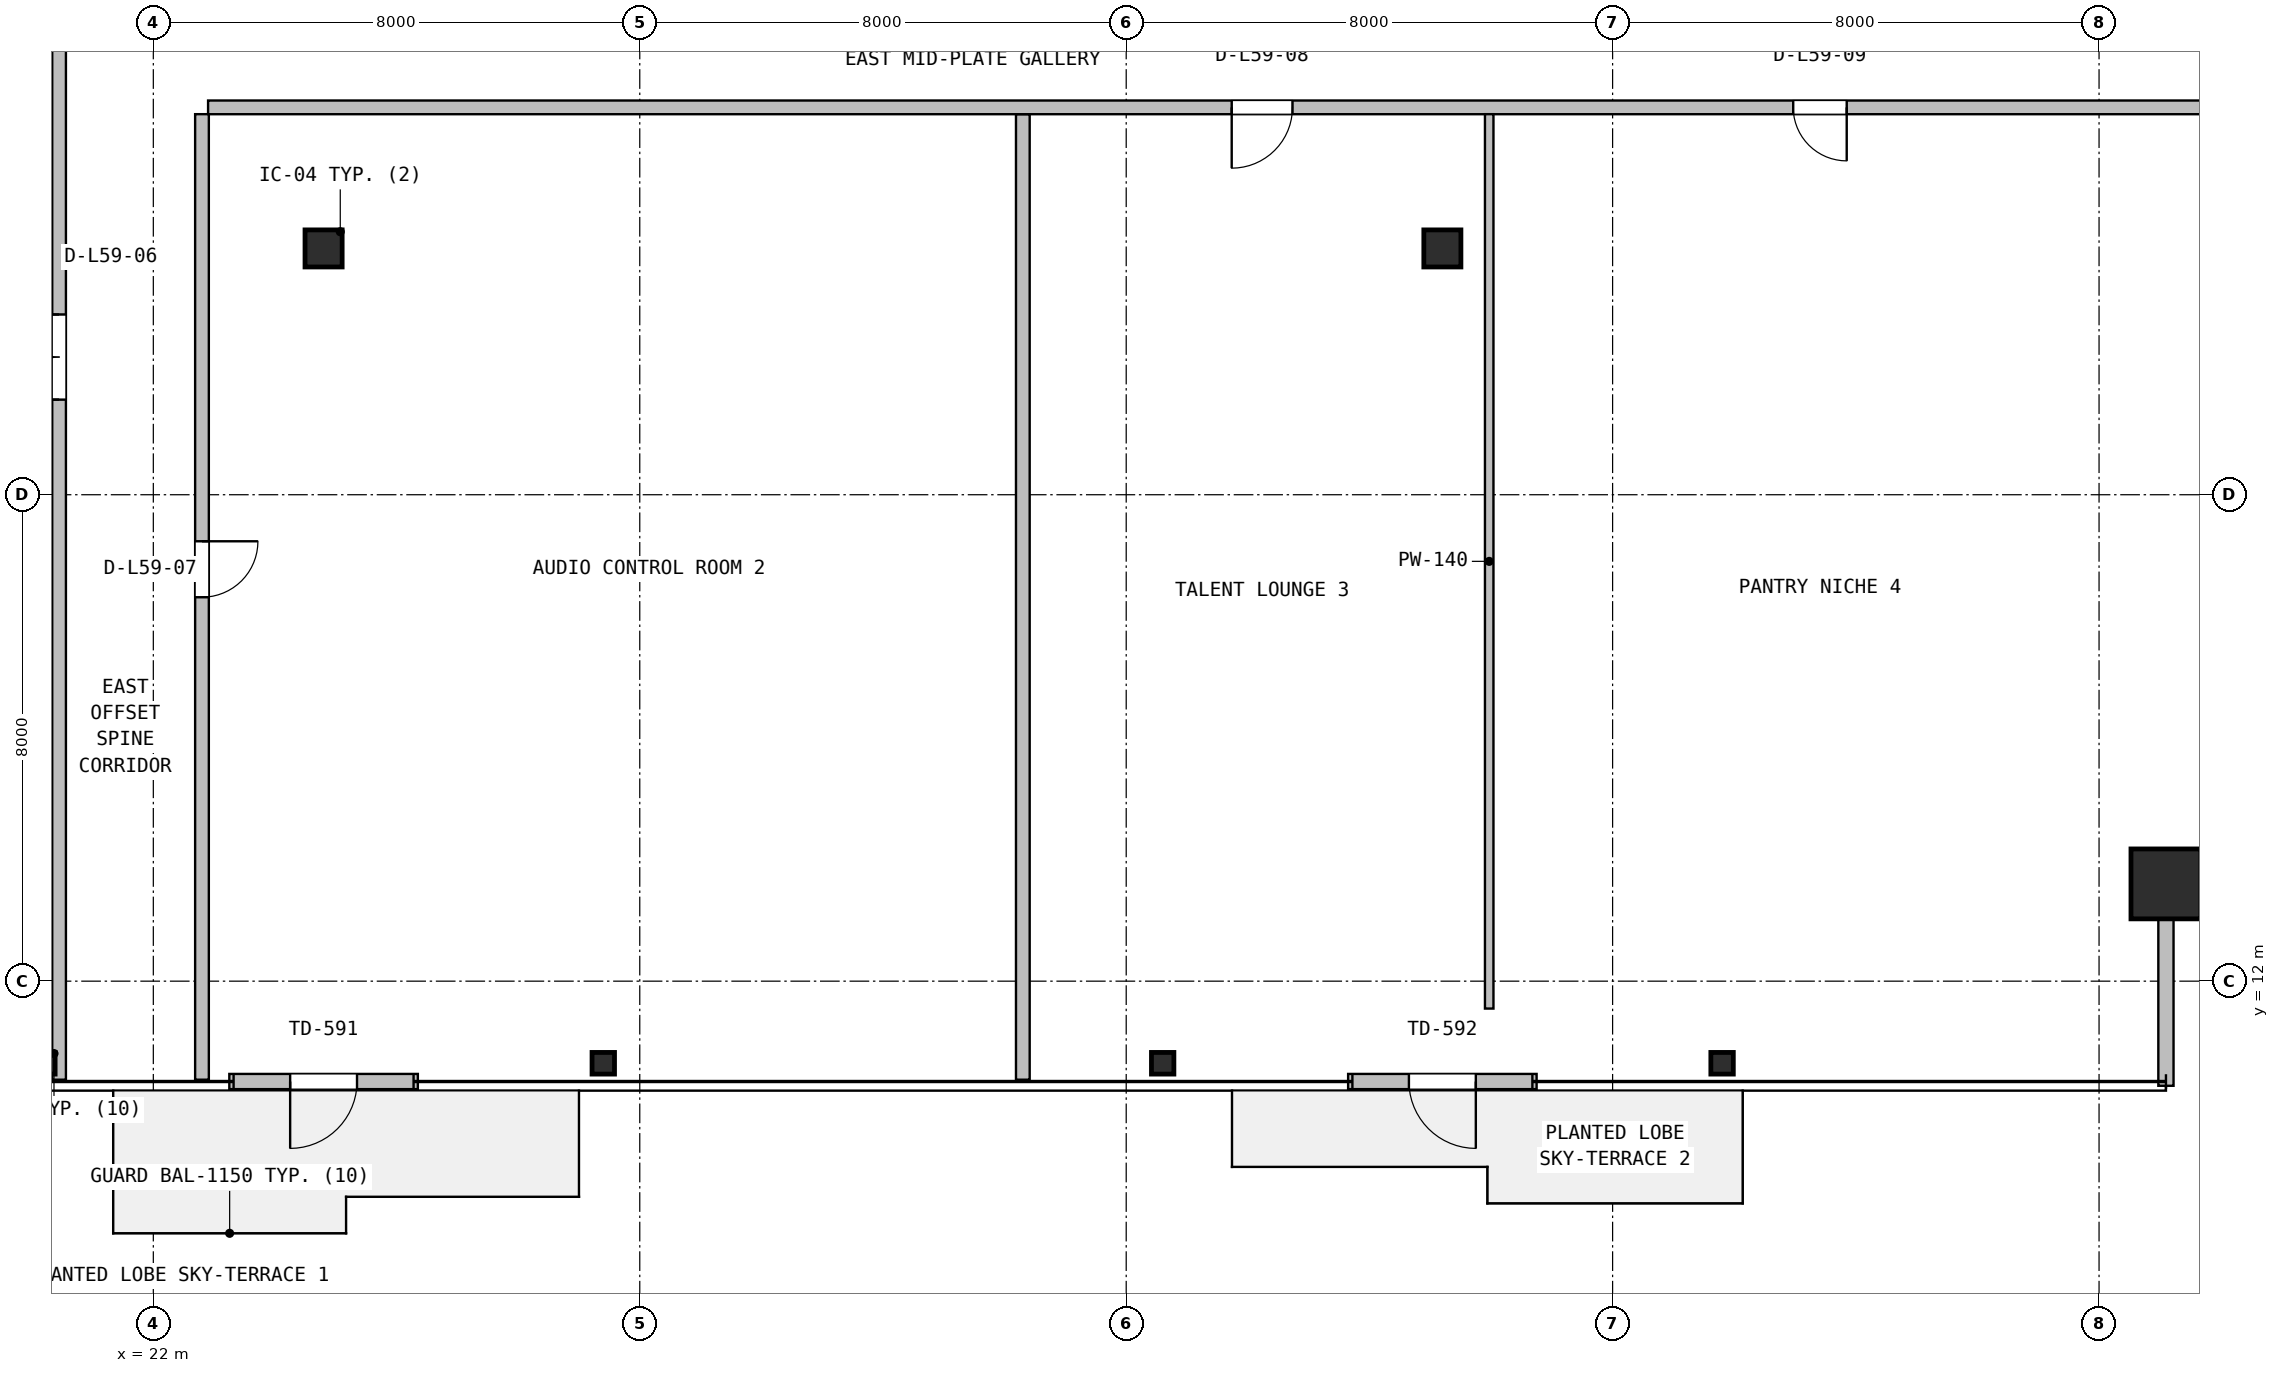
"""IFC4 building model, lengths in metres.
Left out: names, types, materials, properties, quantities, classifications, styles, units other than length and angle.
Written with IfcOpenShell. Run it as: python <this file> out.ifc"""

import sys

from ifc_helpers import new_model, si_unit, direction, frame, frame_2d, origin, origin_2d, place, context, subcontext, project, spatial, rectangle, hollow_rectangle, hollow_circle, i_section, extrude, source, transform, mapped, element, fill, save


model = new_model("IFC4")
c1 = context("Model", 3, precision=1e-05, world=origin(), true_north=direction((0.0, 1.0)))
c2 = subcontext(c1, "Body", "Model", "MODEL_VIEW")
j1 = project(units=[si_unit("LENGTHUNIT", "METRE"), si_unit("PLANEANGLEUNIT", "RADIAN")], contexts=[c1])
p1 = place(None, origin())
s1 = spatial("IfcSite", under=j1, at=p1, CompositionType="ELEMENT")
p2 = place(p1, origin())
s2 = spatial("IfcBuilding", under=s1, at=p2, CompositionType="ELEMENT")
p3 = place(p2, frame((0.0, 0.0, 239.4)))
s3 = spatial("IfcBuildingStorey", under=s2, at=p3, CompositionType="ELEMENT", Elevation=239.4)
m1 = source(origin(), c2, "Body", "SweptSolid", [
    extrude(hollow_rectangle(XDim=1.15, YDim=1.15, WallThickness=0.045, at=origin_2d()), origin(), (0.0, 0.0, 1.0), 3.8),
])
p4 = place(p3, frame((55.1, 13.6, 0.0), z_axis=(0.0, 0.0, 1.0), x_axis=(1.0, 0.0, 0.0)))
e1 = element("IfcColumn", 1, at=p4, inside=s3, PredefinedType="COLUMN", context=c2, shape_type="MappedRepresentation", body=[
    mapped(m1, transform((0.0, 0.0, 0.0), x_axis=(1.0, 0.0, 0.0), y_axis=(0.0, 1.0, 0.0), z_axis=(0.0, 0.0, 1.0), scale=1.0)),
])
m2 = source(origin(), c2, "Body", "SweptSolid", [
    extrude(i_section(OverallWidth=0.369, OverallDepth=0.356, WebThickness=0.011, FlangeThickness=0.018, FilletRadius=0.016, at=origin_2d()), origin(), (0.0, 0.0, 1.0), 3.8),
])
for number, where, z_axis, x_axis in (
    (2, (20.2, 10.65, 0.0), (0.0, 0.0, 1.0), (1.0, 0.0, 0.0)),
    (3, (29.4, 10.65, 0.0), (0.0, 0.0, 1.0), (1.0, 0.0, 0.0)),
    (4, (38.6, 10.65, 0.0), (0.0, 0.0, 1.0), (1.0, 0.0, 0.0)),
    (5, (47.8, 10.65, 0.0), (0.0, 0.0, 1.0), (1.0, 0.0, 0.0)),
):
    element("IfcColumn", number, at=place(p3, frame(where, z_axis=z_axis, x_axis=x_axis)), inside=s3, PredefinedType="COLUMN", context=c2, shape_type="MappedRepresentation", body=[
        mapped(m2, transform((0.0, 0.0, 0.0), x_axis=(1.0, 0.0, 0.0), y_axis=(0.0, 1.0, 0.0), z_axis=(0.0, 0.0, 1.0), scale=1.0)),
    ])
m3 = source(origin(), c2, "Body", "SweptSolid", [
    extrude(hollow_circle(Radius=0.305, WallThickness=0.025, at=origin_2d()), origin(), (0.0, 0.0, 1.0), 3.8),
])
for number, where, z_axis, x_axis in (
    (6, (24.8, 24.05, 0.0), (0.0, 0.0, 1.0), (1.0, 0.0, 0.0)),
    (7, (43.2, 24.05, 0.0), (0.0, 0.0, 1.0), (1.0, 0.0, 0.0)),
):
    element("IfcColumn", number, at=place(p3, frame(where, z_axis=z_axis, x_axis=x_axis)), inside=s3, PredefinedType="COLUMN", context=c2, shape_type="MappedRepresentation", body=[
        mapped(m3, transform((0.0, 0.0, 0.0), x_axis=(1.0, 0.0, 0.0), y_axis=(0.0, 1.0, 0.0), z_axis=(0.0, 0.0, 1.0), scale=1.0)),
    ])
p5 = place(p3, frame((23.25, 10.35, 0.0), z_axis=(0.0, 0.0, 1.0), x_axis=(1.0, 0.0, 0.0)))
e8 = element("IfcWall", 8, at=p5, inside=s3, PredefinedType="SOLIDWALL", context=c2, shape_type="SweptSolid", body=[
    extrude(rectangle(XDim=3.1, YDim=0.25, at=frame_2d((1.55, 0.0))), origin(), (0.0, 0.0, 1.0), 3.53),
])
p6 = place(p5, frame((1.0, 0.0, 0.0)))
e9 = element("IfcOpeningElement", 9, at=p6, cuts=e8, PredefinedType="OPENING", context=c2, shape_type="SweptSolid", body=[
    extrude(rectangle(XDim=1.1, YDim=2.15, at=frame_2d((0.55, 1.075))), frame((0.0, 0.135, 0.0), z_axis=(0.0, -1.0, 0.0), x_axis=(1.0, 0.0, 0.0)), (0.0, 0.0, 1.0), 0.27),
])
p7 = place(p3, frame((41.65, 10.35, 0.0), z_axis=(0.0, 0.0, 1.0), x_axis=(1.0, 0.0, 0.0)))
e10 = element("IfcWall", 10, at=p7, inside=s3, PredefinedType="SOLIDWALL", context=c2, shape_type="SweptSolid", body=[
    extrude(rectangle(XDim=3.1, YDim=0.25, at=frame_2d((1.55, 0.0))), origin(), (0.0, 0.0, 1.0), 3.53),
])
p8 = place(p7, frame((1.0, 0.0, 0.0)))
e11 = element("IfcOpeningElement", 11, at=p8, cuts=e10, PredefinedType="OPENING", context=c2, shape_type="SweptSolid", body=[
    extrude(rectangle(XDim=1.1, YDim=2.15, at=frame_2d((0.55, 1.075))), frame((0.0, 0.135, 0.0), z_axis=(0.0, -1.0, 0.0), x_axis=(1.0, 0.0, 0.0)), (0.0, 0.0, 1.0), 0.27),
])
p9 = place(p3, frame((55.1, 10.28, 0.0), z_axis=(0.0, 0.0, 1.0), x_axis=(0.0, 1.0, 0.0)))
e12 = element("IfcWall", 12, at=p9, inside=s3, PredefinedType="SOLIDWALL", context=c2, shape_type="SweptSolid", body=[
    extrude(rectangle(XDim=3.4, YDim=0.25, at=frame_2d((1.7, 0.0))), origin(), (0.0, 0.0, 1.0), 3.171),
])
p10 = place(p3, frame((20.45, 10.38, 0.0), z_axis=(0.0, 0.0, 1.0), x_axis=(0.0, 1.0, 0.0)))
e13 = element("IfcWall", 13, at=p10, inside=s3, PredefinedType="PARTITIONING", context=c2, shape_type="SweptSolid", body=[
    extrude(rectangle(XDim=22.858, YDim=0.225, at=frame_2d((11.429, 0.0))), origin(), (0.0, 0.0, 1.0), 3.171),
])
p11 = place(p10, frame((11.184, 0.0, 0.0)))
e14 = element("IfcOpeningElement", 14, at=p11, cuts=e13, PredefinedType="OPENING", context=c2, shape_type="SweptSolid", body=[
    extrude(rectangle(XDim=1.4, YDim=2.12, at=frame_2d((0.7, 1.06))), frame((0.0, 0.123, 0.0), z_axis=(0.0, -1.0, 0.0), x_axis=(1.0, 0.0, 0.0)), (0.0, 0.0, 1.0), 0.245),
])
p12 = place(p3, frame((36.3, 10.38, 0.0), z_axis=(0.0, 0.0, 1.0), x_axis=(0.0, 1.0, 0.0)))
e15 = element("IfcWall", 15, at=p12, inside=s3, PredefinedType="PARTITIONING", context=c2, shape_type="SweptSolid", body=[
    extrude(rectangle(XDim=15.878, YDim=0.225, at=frame_2d((7.939, 0.0))), origin(), (0.0, 0.0, 1.0), 2.908),
])
p13 = place(p3, frame((22.9, 26.37, 0.0), z_axis=(0.0, 0.0, 1.0), x_axis=(1.0, 0.0, 0.0)))
e16 = element("IfcWall", 16, at=p13, inside=s3, PredefinedType="PARTITIONING", context=c2, shape_type="SweptSolid", body=[
    extrude(rectangle(XDim=35.42, YDim=0.225, at=frame_2d((17.71, 0.0))), origin(), (0.0, 0.0, 1.0), 2.908),
])
p14 = place(p13, frame((16.835, 0.0, 0.0)))
e17 = element("IfcOpeningElement", 17, at=p14, cuts=e16, PredefinedType="OPENING", context=c2, shape_type="SweptSolid", body=[
    extrude(rectangle(XDim=1.0, YDim=2.1, at=frame_2d((0.5, 1.05))), frame((0.0, 0.123, 0.0), z_axis=(0.0, -1.0, 0.0), x_axis=(1.0, 0.0, 0.0)), (0.0, 0.0, 1.0), 0.245),
])
p15 = place(p13, frame((26.07, 0.0, 0.0)))
e18 = element("IfcOpeningElement", 18, at=p15, cuts=e16, PredefinedType="OPENING", context=c2, shape_type="SweptSolid", body=[
    extrude(rectangle(XDim=0.88, YDim=2.06, at=frame_2d((0.44, 1.03))), frame((0.0, 0.123, 0.0), z_axis=(0.0, -1.0, 0.0), x_axis=(1.0, 0.0, 0.0)), (0.0, 0.0, 1.0), 0.245),
])
p16 = place(p3, frame((22.8, 10.38, 0.0), z_axis=(0.0, 0.0, 1.0), x_axis=(0.0, 1.0, 0.0)))
e19 = element("IfcWall", 19, at=p16, inside=s3, PredefinedType="PARTITIONING", context=c2, shape_type="SweptSolid", body=[
    extrude(rectangle(XDim=15.878, YDim=0.225, at=frame_2d((7.939, 0.0))), origin(), (0.0, 0.0, 1.0), 3.171),
])
p17 = place(p16, frame((7.934, 0.0, 0.0)))
e20 = element("IfcOpeningElement", 20, at=p17, cuts=e19, PredefinedType="OPENING", context=c2, shape_type="SweptSolid", body=[
    extrude(rectangle(XDim=0.92, YDim=2.08, at=frame_2d((0.46, 1.04))), frame((0.0, 0.123, 0.0), z_axis=(0.0, -1.0, 0.0), x_axis=(1.0, 0.0, 0.0)), (0.0, 0.0, 1.0), 0.245),
])
p18 = place(p3, frame((43.97, 11.55, 0.0), z_axis=(0.0, 0.0, 1.0), x_axis=(0.0, 1.0, 0.0)))
e21 = element("IfcWall", 21, at=p18, inside=s3, PredefinedType="PARTITIONING", context=c2, shape_type="SweptSolid", body=[
    extrude(rectangle(XDim=14.708, YDim=0.14, at=frame_2d((7.354, 0.0))), origin(), (0.0, 0.0, 1.0), 2.908),
])
m4 = source(origin(), c2, "Body", "SweptSolid", [
    extrude(rectangle(XDim=1.1, YDim=2.15, at=frame_2d((0.55, 1.075))), frame((0.0, 0.025, 0.0), z_axis=(0.0, -1.0, 0.0), x_axis=(1.0, 0.0, 0.0)), (0.0, 0.0, 1.0), 0.05),
])
p19 = place(p6, frame((1.1, 0.0, 0.0), z_axis=(0.0, 0.0, 1.0), x_axis=(-1.0, 0.0, 0.0)))
e22 = element("IfcDoor", 22, at=p19, inside=s3, OperationType="SINGLE_SWING_LEFT", PredefinedType="DOOR", context=c2, shape_type="MappedRepresentation", body=[
    mapped(m4, transform((0.0, 0.0, 0.0), x_axis=(1.0, 0.0, 0.0), y_axis=(0.0, 1.0, 0.0), z_axis=(0.0, 0.0, 1.0), scale=1.0)),
])
fill(e9, e22)
p20 = place(p8, frame((1.1, 0.0, 0.0), z_axis=(0.0, 0.0, 1.0), x_axis=(-1.0, 0.0, 0.0)))
e23 = element("IfcDoor", 23, at=p20, inside=s3, OperationType="SINGLE_SWING_RIGHT", PredefinedType="DOOR", context=c2, shape_type="MappedRepresentation", body=[
    mapped(m4, transform((0.0, 0.0, 0.0), x_axis=(1.0, 0.0, 0.0), y_axis=(0.0, 1.0, 0.0), z_axis=(0.0, 0.0, 1.0), scale=1.0)),
])
fill(e11, e23)
m5 = source(origin(), c2, "Body", "SweptSolid", [
    extrude(rectangle(XDim=1.4, YDim=2.12, at=frame_2d((0.7, 1.06))), frame((0.0, 0.025, 0.0), z_axis=(0.0, -1.0, 0.0), x_axis=(1.0, 0.0, 0.0)), (0.0, 0.0, 1.0), 0.05),
])
p21 = place(p11, origin())
e24 = element("IfcDoor", 24, at=p21, inside=s3, OperationType="DOUBLE_DOOR_SINGLE_SWING", PredefinedType="DOOR", context=c2, shape_type="MappedRepresentation", body=[
    mapped(m5, transform((0.0, 0.0, 0.0), x_axis=(1.0, 0.0, 0.0), y_axis=(0.0, 1.0, 0.0), z_axis=(0.0, 0.0, 1.0), scale=1.0)),
])
fill(e14, e24)
m6 = source(origin(), c2, "Body", "SweptSolid", [
    extrude(rectangle(XDim=0.92, YDim=2.08, at=frame_2d((0.46, 1.04))), frame((0.0, 0.025, 0.0), z_axis=(0.0, -1.0, 0.0), x_axis=(1.0, 0.0, 0.0)), (0.0, 0.0, 1.0), 0.05),
])
p22 = place(p17, frame((0.92, 0.0, 0.0), z_axis=(0.0, 0.0, 1.0), x_axis=(-1.0, 0.0, 0.0)))
e25 = element("IfcDoor", 25, at=p22, inside=s3, OperationType="SINGLE_SWING_RIGHT", PredefinedType="DOOR", context=c2, shape_type="MappedRepresentation", body=[
    mapped(m6, transform((0.0, 0.0, 0.0), x_axis=(1.0, 0.0, 0.0), y_axis=(0.0, 1.0, 0.0), z_axis=(0.0, 0.0, 1.0), scale=1.0)),
])
fill(e20, e25)
m7 = source(origin(), c2, "Body", "SweptSolid", [
    extrude(rectangle(XDim=1.0, YDim=2.1, at=frame_2d((0.5, 1.05))), frame((0.0, 0.025, 0.0), z_axis=(0.0, -1.0, 0.0), x_axis=(1.0, 0.0, 0.0)), (0.0, 0.0, 1.0), 0.05),
])
p23 = place(p14, frame((1.0, 0.0, 0.0), z_axis=(0.0, 0.0, 1.0), x_axis=(-1.0, 0.0, 0.0)))
e26 = element("IfcDoor", 26, at=p23, inside=s3, OperationType="SINGLE_SWING_LEFT", PredefinedType="DOOR", context=c2, shape_type="MappedRepresentation", body=[
    mapped(m7, transform((0.0, 0.0, 0.0), x_axis=(1.0, 0.0, 0.0), y_axis=(0.0, 1.0, 0.0), z_axis=(0.0, 0.0, 1.0), scale=1.0)),
])
fill(e17, e26)
m8 = source(origin(), c2, "Body", "SweptSolid", [
    extrude(rectangle(XDim=0.88, YDim=2.06, at=frame_2d((0.44, 1.03))), frame((0.0, 0.025, 0.0), z_axis=(0.0, -1.0, 0.0), x_axis=(1.0, 0.0, 0.0)), (0.0, 0.0, 1.0), 0.05),
])
p24 = place(p15, frame((0.88, 0.0, 0.0), z_axis=(0.0, 0.0, 1.0), x_axis=(-1.0, 0.0, 0.0)))
e27 = element("IfcDoor", 27, at=p24, inside=s3, OperationType="SINGLE_SWING_RIGHT", PredefinedType="DOOR", context=c2, shape_type="MappedRepresentation", body=[
    mapped(m8, transform((0.0, 0.0, 0.0), x_axis=(1.0, 0.0, 0.0), y_axis=(0.0, 1.0, 0.0), z_axis=(0.0, 0.0, 1.0), scale=1.0)),
])
fill(e18, e27)
save(model, sys.argv[1])
